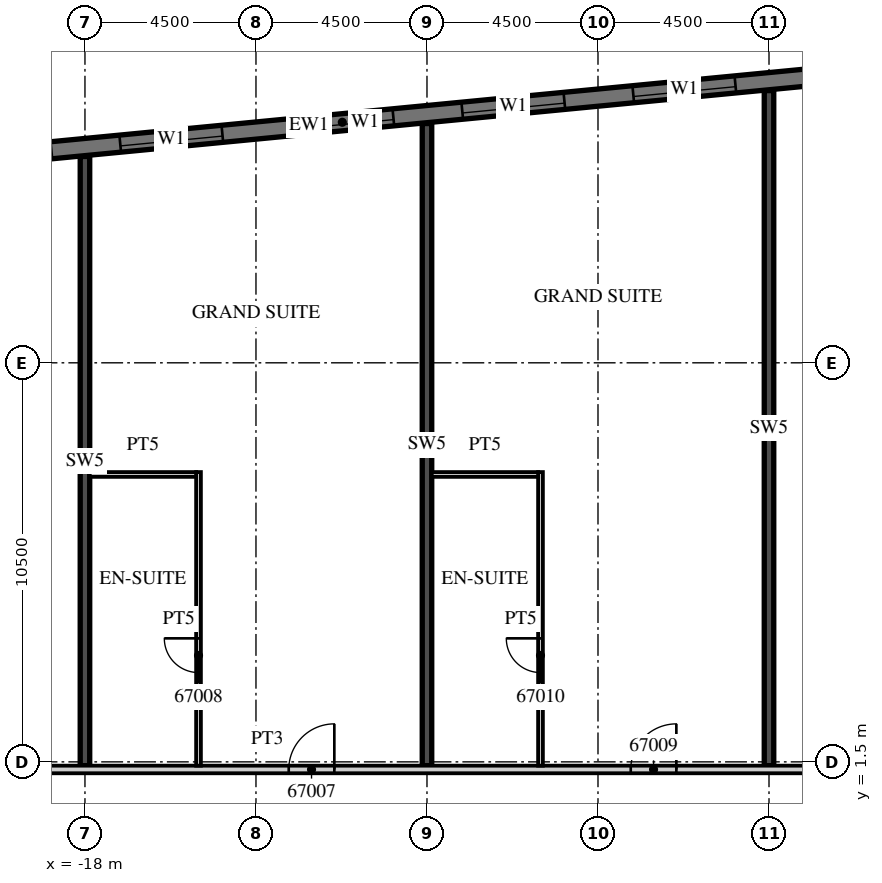
"""IFC4 building model, lengths in metres.
Left out: names, types, materials, properties, quantities, classifications, styles, units other than length and angle.
Written with IfcOpenShell. Run it as: python <this file> out.ifc"""

import sys

from ifc_helpers import new_model, si_unit, direction, frame, frame_2d, origin, place, context, subcontext, project, spatial, rectangle, extrude, element, fill, save


model = new_model("IFC4")
c1 = context("Model", 3, precision=1e-05, world=origin(), true_north=direction((0.0, 1.0)))
c2 = subcontext(c1, "Body", "Model", "MODEL_VIEW")
j1 = project(units=[si_unit("LENGTHUNIT", "METRE"), si_unit("PLANEANGLEUNIT", "RADIAN")], contexts=[c1])
p1 = place(None, origin())
s1 = spatial("IfcSite", under=j1, at=p1, CompositionType="ELEMENT")
p2 = place(p1, origin())
s2 = spatial("IfcBuilding", under=s1, at=p2, CompositionType="ELEMENT")
p3 = place(p2, frame((0.0, 0.0, 271.8)))
s3 = spatial("IfcBuildingStorey", under=s2, at=p3, CompositionType="ELEMENT", Elevation=271.8)
p4 = place(p3, frame((-18.0, 1.4, 0.0), z_axis=(0.0, 0.0, 1.0), x_axis=(0.0, 1.0, 0.0)))
e1 = element("IfcWall", 1, at=p4, inside=s3, PredefinedType="SHEAR", context=c2, shape_type="SweptSolid", body=[
    extrude(rectangle(XDim=16.03, YDim=0.25, at=frame_2d((8.015, 0.0))), origin(), (0.0, 0.0, 1.0), 3.3),
])
p5 = place(p3, frame((-9.0, 1.4, 0.0), z_axis=(0.0, 0.0, 1.0), x_axis=(0.0, 1.0, 0.0)))
e2 = element("IfcWall", 2, at=p5, inside=s3, PredefinedType="SHEAR", context=c2, shape_type="SweptSolid", body=[
    extrude(rectangle(XDim=16.896, YDim=0.25, at=frame_2d((8.448, 0.0))), origin(), (0.0, 0.0, 1.0), 3.3),
])
p6 = place(p3, frame((0.0, 1.4, 0.0), z_axis=(0.0, 0.0, 1.0), x_axis=(0.0, 1.0, 0.0)))
e3 = element("IfcWall", 3, at=p6, inside=s3, PredefinedType="SHEAR", context=c2, shape_type="SweptSolid", body=[
    extrude(rectangle(XDim=17.763, YDim=0.25, at=frame_2d((8.881, 0.0))), origin(), (0.0, 0.0, 1.0), 3.3),
])
p7 = place(p3, frame((13.521, 20.713, 0.0), z_axis=(0.0, 0.0, 1.0), x_axis=(-0.995396277313, -0.095844932638, 0.0)))
e4 = element("IfcWall", 4, at=p7, inside=s3, PredefinedType="SOLIDWALL", context=c2, shape_type="SweptSolid", body=[
    extrude(rectangle(XDim=51.495, YDim=0.45, at=frame_2d((25.748, 0.0))), origin(), (0.0, 0.0, 1.0), 3.02),
])
p8 = place(p7, frame((0.91, 0.0, 0.45)))
e5 = element("IfcOpeningElement", 5, at=p8, cuts=e4, PredefinedType="OPENING", context=c2, shape_type="SweptSolid", body=[
    extrude(rectangle(XDim=2.7, YDim=2.25, at=frame_2d((1.35, 1.125))), frame((0.0, 0.235, 0.0), z_axis=(0.0, -1.0, 0.0), x_axis=(1.0, 0.0, 0.0)), (0.0, 0.0, 1.0), 0.47),
])
p9 = place(p7, frame((5.431, 0.0, 0.45)))
e6 = element("IfcOpeningElement", 6, at=p9, cuts=e4, PredefinedType="OPENING", context=c2, shape_type="SweptSolid", body=[
    extrude(rectangle(XDim=2.7, YDim=2.25, at=frame_2d((1.35, 1.125))), frame((0.0, 0.235, 0.0), z_axis=(0.0, -1.0, 0.0), x_axis=(1.0, 0.0, 0.0)), (0.0, 0.0, 1.0), 0.47),
])
p10 = place(p7, frame((9.952, 0.0, 0.45)))
e7 = element("IfcOpeningElement", 7, at=p10, cuts=e4, PredefinedType="OPENING", context=c2, shape_type="SweptSolid", body=[
    extrude(rectangle(XDim=2.7, YDim=2.25, at=frame_2d((1.35, 1.125))), frame((0.0, 0.235, 0.0), z_axis=(0.0, -1.0, 0.0), x_axis=(1.0, 0.0, 0.0)), (0.0, 0.0, 1.0), 0.47),
])
p11 = place(p7, frame((14.473, 0.0, 0.45)))
e8 = element("IfcOpeningElement", 8, at=p11, cuts=e4, PredefinedType="OPENING", context=c2, shape_type="SweptSolid", body=[
    extrude(rectangle(XDim=2.7, YDim=2.25, at=frame_2d((1.35, 1.125))), frame((0.0, 0.235, 0.0), z_axis=(0.0, -1.0, 0.0), x_axis=(1.0, 0.0, 0.0)), (0.0, 0.0, 1.0), 0.47),
])
p12 = place(p7, frame((18.994, 0.0, 0.45)))
e9 = element("IfcOpeningElement", 9, at=p12, cuts=e4, PredefinedType="OPENING", context=c2, shape_type="SweptSolid", body=[
    extrude(rectangle(XDim=2.7, YDim=2.25, at=frame_2d((1.35, 1.125))), frame((0.0, 0.235, 0.0), z_axis=(0.0, -1.0, 0.0), x_axis=(1.0, 0.0, 0.0)), (0.0, 0.0, 1.0), 0.47),
])
p13 = place(p7, frame((23.514, 0.0, 0.45)))
e10 = element("IfcOpeningElement", 10, at=p13, cuts=e4, PredefinedType="OPENING", context=c2, shape_type="SweptSolid", body=[
    extrude(rectangle(XDim=2.7, YDim=2.25, at=frame_2d((1.35, 1.125))), frame((0.0, 0.235, 0.0), z_axis=(0.0, -1.0, 0.0), x_axis=(1.0, 0.0, 0.0)), (0.0, 0.0, 1.0), 0.47),
])
p14 = place(p7, frame((28.035, 0.0, 0.45)))
e11 = element("IfcOpeningElement", 11, at=p14, cuts=e4, PredefinedType="OPENING", context=c2, shape_type="SweptSolid", body=[
    extrude(rectangle(XDim=2.7, YDim=2.25, at=frame_2d((1.35, 1.125))), frame((0.0, 0.235, 0.0), z_axis=(0.0, -1.0, 0.0), x_axis=(1.0, 0.0, 0.0)), (0.0, 0.0, 1.0), 0.47),
])
p15 = place(p7, frame((32.556, 0.0, 0.45)))
e12 = element("IfcOpeningElement", 12, at=p15, cuts=e4, PredefinedType="OPENING", context=c2, shape_type="SweptSolid", body=[
    extrude(rectangle(XDim=2.7, YDim=2.25, at=frame_2d((1.35, 1.125))), frame((0.0, 0.235, 0.0), z_axis=(0.0, -1.0, 0.0), x_axis=(1.0, 0.0, 0.0)), (0.0, 0.0, 1.0), 0.47),
])
p16 = place(p7, frame((37.077, 0.0, 0.45)))
e13 = element("IfcOpeningElement", 13, at=p16, cuts=e4, PredefinedType="OPENING", context=c2, shape_type="SweptSolid", body=[
    extrude(rectangle(XDim=2.7, YDim=2.25, at=frame_2d((1.35, 1.125))), frame((0.0, 0.235, 0.0), z_axis=(0.0, -1.0, 0.0), x_axis=(1.0, 0.0, 0.0)), (0.0, 0.0, 1.0), 0.47),
])
p17 = place(p7, frame((41.598, 0.0, 0.45)))
e14 = element("IfcOpeningElement", 14, at=p17, cuts=e4, PredefinedType="OPENING", context=c2, shape_type="SweptSolid", body=[
    extrude(rectangle(XDim=2.7, YDim=2.25, at=frame_2d((1.35, 1.125))), frame((0.0, 0.235, 0.0), z_axis=(0.0, -1.0, 0.0), x_axis=(1.0, 0.0, 0.0)), (0.0, 0.0, 1.0), 0.47),
])
p18 = place(p7, frame((46.118, 0.0, 0.45)))
e15 = element("IfcOpeningElement", 15, at=p18, cuts=e4, PredefinedType="OPENING", context=c2, shape_type="SweptSolid", body=[
    extrude(rectangle(XDim=2.7, YDim=2.25, at=frame_2d((1.35, 1.125))), frame((0.0, 0.235, 0.0), z_axis=(0.0, -1.0, 0.0), x_axis=(1.0, 0.0, 0.0)), (0.0, 0.0, 1.0), 0.47),
])
p19 = place(p3, frame((-39.909, 1.3, 0.0), z_axis=(0.0, 0.0, 1.0), x_axis=(1.0, 0.0, 0.0)))
e16 = element("IfcWall", 16, at=p19, inside=s3, PredefinedType="PARTITIONING", context=c2, shape_type="SweptSolid", body=[
    extrude(rectangle(XDim=53.409, YDim=0.2, at=frame_2d((26.705, 0.0))), origin(), (0.0, 0.0, 1.0), 3.02),
])
p20 = place(p19, frame((0.15, 0.0, 0.0)))
e17 = element("IfcOpeningElement", 17, at=p20, cuts=e16, PredefinedType="OPENING", context=c2, shape_type="SweptSolid", body=[
    extrude(rectangle(XDim=0.9, YDim=2.1, at=frame_2d((0.45, 1.05))), frame((0.0, 0.11, 0.0), z_axis=(0.0, -1.0, 0.0), x_axis=(1.0, 0.0, 0.0)), (0.0, 0.0, 1.0), 0.22),
])
p21 = place(p19, frame((9.271, 0.0, 0.0)))
e18 = element("IfcOpeningElement", 18, at=p21, cuts=e16, PredefinedType="OPENING", context=c2, shape_type="SweptSolid", body=[
    extrude(rectangle(XDim=1.2, YDim=2.1, at=frame_2d((0.6, 1.05))), frame((0.0, 0.11, 0.0), z_axis=(0.0, -1.0, 0.0), x_axis=(1.0, 0.0, 0.0)), (0.0, 0.0, 1.0), 0.22),
])
p22 = place(p19, frame((18.271, 0.0, 0.0)))
e19 = element("IfcOpeningElement", 19, at=p22, cuts=e16, PredefinedType="OPENING", context=c2, shape_type="SweptSolid", body=[
    extrude(rectangle(XDim=1.2, YDim=2.1, at=frame_2d((0.6, 1.05))), frame((0.0, 0.11, 0.0), z_axis=(0.0, -1.0, 0.0), x_axis=(1.0, 0.0, 0.0)), (0.0, 0.0, 1.0), 0.22),
])
p23 = place(p19, frame((27.271, 0.0, 0.0)))
e20 = element("IfcOpeningElement", 20, at=p23, cuts=e16, PredefinedType="OPENING", context=c2, shape_type="SweptSolid", body=[
    extrude(rectangle(XDim=1.2, YDim=2.1, at=frame_2d((0.6, 1.05))), frame((0.0, 0.11, 0.0), z_axis=(0.0, -1.0, 0.0), x_axis=(1.0, 0.0, 0.0)), (0.0, 0.0, 1.0), 0.22),
])
p24 = place(p19, frame((36.271, 0.0, 0.0)))
e21 = element("IfcOpeningElement", 21, at=p24, cuts=e16, PredefinedType="OPENING", context=c2, shape_type="SweptSolid", body=[
    extrude(rectangle(XDim=1.2, YDim=2.1, at=frame_2d((0.6, 1.05))), frame((0.0, 0.11, 0.0), z_axis=(0.0, -1.0, 0.0), x_axis=(1.0, 0.0, 0.0)), (0.0, 0.0, 1.0), 0.22),
])
p25 = place(p19, frame((42.346, 0.0, 0.0)))
e22 = element("IfcOpeningElement", 22, at=p25, cuts=e16, PredefinedType="OPENING", context=c2, shape_type="SweptSolid", body=[
    extrude(rectangle(XDim=1.2, YDim=2.1, at=frame_2d((0.6, 1.05))), frame((0.0, 0.11, 0.0), z_axis=(0.0, -1.0, 0.0), x_axis=(1.0, 0.0, 0.0)), (0.0, 0.0, 1.0), 0.22),
])
p26 = place(p19, frame((51.834, 0.0, 0.0)))
e23 = element("IfcOpeningElement", 23, at=p26, cuts=e16, PredefinedType="OPENING", context=c2, shape_type="SweptSolid", body=[
    extrude(rectangle(XDim=1.0, YDim=2.1, at=frame_2d((0.5, 1.05))), frame((0.0, 0.11, 0.0), z_axis=(0.0, -1.0, 0.0), x_axis=(1.0, 0.0, 0.0)), (0.0, 0.0, 1.0), 0.22),
])
p27 = place(p3, frame((-15.012, 1.4, 0.0), z_axis=(0.0, 0.0, 1.0), x_axis=(0.0, 1.0, 0.0)))
e24 = element("IfcWall", 24, at=p27, inside=s3, PredefinedType="PARTITIONING", context=c2, shape_type="SweptSolid", body=[
    extrude(rectangle(XDim=7.725, YDim=0.125, at=frame_2d((3.863, 0.0))), origin(), (0.0, 0.0, 1.0), 3.02),
])
p28 = place(p27, frame((2.45, 0.0, 0.0)))
e25 = element("IfcOpeningElement", 25, at=p28, cuts=e24, PredefinedType="OPENING", context=c2, shape_type="SweptSolid", body=[
    extrude(rectangle(XDim=0.9, YDim=2.1, at=frame_2d((0.45, 1.05))), frame((0.0, 0.073, 0.0), z_axis=(0.0, -1.0, 0.0), x_axis=(1.0, 0.0, 0.0)), (0.0, 0.0, 1.0), 0.145),
])
p29 = place(p3, frame((-17.875, 9.062, 0.0), z_axis=(0.0, 0.0, 1.0), x_axis=(1.0, 0.0, 0.0)))
e26 = element("IfcWall", 26, at=p29, inside=s3, PredefinedType="PARTITIONING", context=c2, shape_type="SweptSolid", body=[
    extrude(rectangle(XDim=2.8, YDim=0.125, at=frame_2d((1.4, 0.0))), origin(), (0.0, 0.0, 1.0), 3.02),
])
p30 = place(p3, frame((-6.013, 1.4, 0.0), z_axis=(0.0, 0.0, 1.0), x_axis=(0.0, 1.0, 0.0)))
e27 = element("IfcWall", 27, at=p30, inside=s3, PredefinedType="PARTITIONING", context=c2, shape_type="SweptSolid", body=[
    extrude(rectangle(XDim=7.725, YDim=0.125, at=frame_2d((3.863, 0.0))), origin(), (0.0, 0.0, 1.0), 3.02),
])
p31 = place(p30, frame((2.45, 0.0, 0.0)))
e28 = element("IfcOpeningElement", 28, at=p31, cuts=e27, PredefinedType="OPENING", context=c2, shape_type="SweptSolid", body=[
    extrude(rectangle(XDim=0.9, YDim=2.1, at=frame_2d((0.45, 1.05))), frame((0.0, 0.073, 0.0), z_axis=(0.0, -1.0, 0.0), x_axis=(1.0, 0.0, 0.0)), (0.0, 0.0, 1.0), 0.145),
])
p32 = place(p3, frame((-8.875, 9.062, 0.0), z_axis=(0.0, 0.0, 1.0), x_axis=(1.0, 0.0, 0.0)))
e29 = element("IfcWall", 29, at=p32, inside=s3, PredefinedType="PARTITIONING", context=c2, shape_type="SweptSolid", body=[
    extrude(rectangle(XDim=2.8, YDim=0.125, at=frame_2d((1.4, 0.0))), origin(), (0.0, 0.0, 1.0), 3.02),
])
p33 = place(p11, origin())
e30 = element("IfcWindow", 30, at=p33, inside=s3, PartitioningType="SINGLE_PANEL", PredefinedType="WINDOW", context=c2, shape_type="SweptSolid", body=[
    extrude(rectangle(XDim=2.7, YDim=2.25, at=frame_2d((1.35, 1.125))), frame((0.0, 0.09, 0.0), z_axis=(0.0, -1.0, 0.0), x_axis=(1.0, 0.0, 0.0)), (0.0, 0.0, 1.0), 0.06),
])
fill(e8, e30)
p34 = place(p12, origin())
e31 = element("IfcWindow", 31, at=p34, inside=s3, PartitioningType="SINGLE_PANEL", PredefinedType="WINDOW", context=c2, shape_type="SweptSolid", body=[
    extrude(rectangle(XDim=2.7, YDim=2.25, at=frame_2d((1.35, 1.125))), frame((0.0, 0.09, 0.0), z_axis=(0.0, -1.0, 0.0), x_axis=(1.0, 0.0, 0.0)), (0.0, 0.0, 1.0), 0.06),
])
fill(e9, e31)
p35 = place(p13, origin())
e32 = element("IfcWindow", 32, at=p35, inside=s3, PartitioningType="SINGLE_PANEL", PredefinedType="WINDOW", context=c2, shape_type="SweptSolid", body=[
    extrude(rectangle(XDim=2.7, YDim=2.25, at=frame_2d((1.35, 1.125))), frame((0.0, 0.09, 0.0), z_axis=(0.0, -1.0, 0.0), x_axis=(1.0, 0.0, 0.0)), (0.0, 0.0, 1.0), 0.06),
])
fill(e10, e32)
p36 = place(p14, origin())
e33 = element("IfcWindow", 33, at=p36, inside=s3, PartitioningType="SINGLE_PANEL", PredefinedType="WINDOW", context=c2, shape_type="SweptSolid", body=[
    extrude(rectangle(XDim=2.7, YDim=2.25, at=frame_2d((1.35, 1.125))), frame((0.0, 0.09, 0.0), z_axis=(0.0, -1.0, 0.0), x_axis=(1.0, 0.0, 0.0)), (0.0, 0.0, 1.0), 0.06),
])
fill(e11, e33)
p37 = place(p23, origin())
e34 = element("IfcDoor", 34, at=p37, inside=s3, OperationType="SINGLE_SWING_RIGHT", PredefinedType="DOOR", context=c2, shape_type="SweptSolid", body=[
    extrude(rectangle(XDim=1.2, YDim=2.1, at=frame_2d((0.6, 1.05))), frame((0.0, 0.025, 0.0), z_axis=(0.0, -1.0, 0.0), x_axis=(1.0, 0.0, 0.0)), (0.0, 0.0, 1.0), 0.05),
])
fill(e20, e34)
p38 = place(p28, origin())
e35 = element("IfcDoor", 35, at=p38, inside=s3, OperationType="SINGLE_SWING_RIGHT", PredefinedType="DOOR", context=c2, shape_type="SweptSolid", body=[
    extrude(rectangle(XDim=0.9, YDim=2.1, at=frame_2d((0.45, 1.05))), frame((0.0, 0.025, 0.0), z_axis=(0.0, -1.0, 0.0), x_axis=(1.0, 0.0, 0.0)), (0.0, 0.0, 1.0), 0.05),
])
fill(e25, e35)
p39 = place(p24, origin())
e36 = element("IfcDoor", 36, at=p39, inside=s3, OperationType="SINGLE_SWING_RIGHT", PredefinedType="DOOR", context=c2, shape_type="SweptSolid", body=[
    extrude(rectangle(XDim=1.2, YDim=2.1, at=frame_2d((0.6, 1.05))), frame((0.0, 0.025, 0.0), z_axis=(0.0, -1.0, 0.0), x_axis=(1.0, 0.0, 0.0)), (0.0, 0.0, 1.0), 0.05),
])
fill(e21, e36)
p40 = place(p31, origin())
e37 = element("IfcDoor", 37, at=p40, inside=s3, OperationType="SINGLE_SWING_RIGHT", PredefinedType="DOOR", context=c2, shape_type="SweptSolid", body=[
    extrude(rectangle(XDim=0.9, YDim=2.1, at=frame_2d((0.45, 1.05))), frame((0.0, 0.025, 0.0), z_axis=(0.0, -1.0, 0.0), x_axis=(1.0, 0.0, 0.0)), (0.0, 0.0, 1.0), 0.05),
])
fill(e28, e37)
save(model, sys.argv[1])
